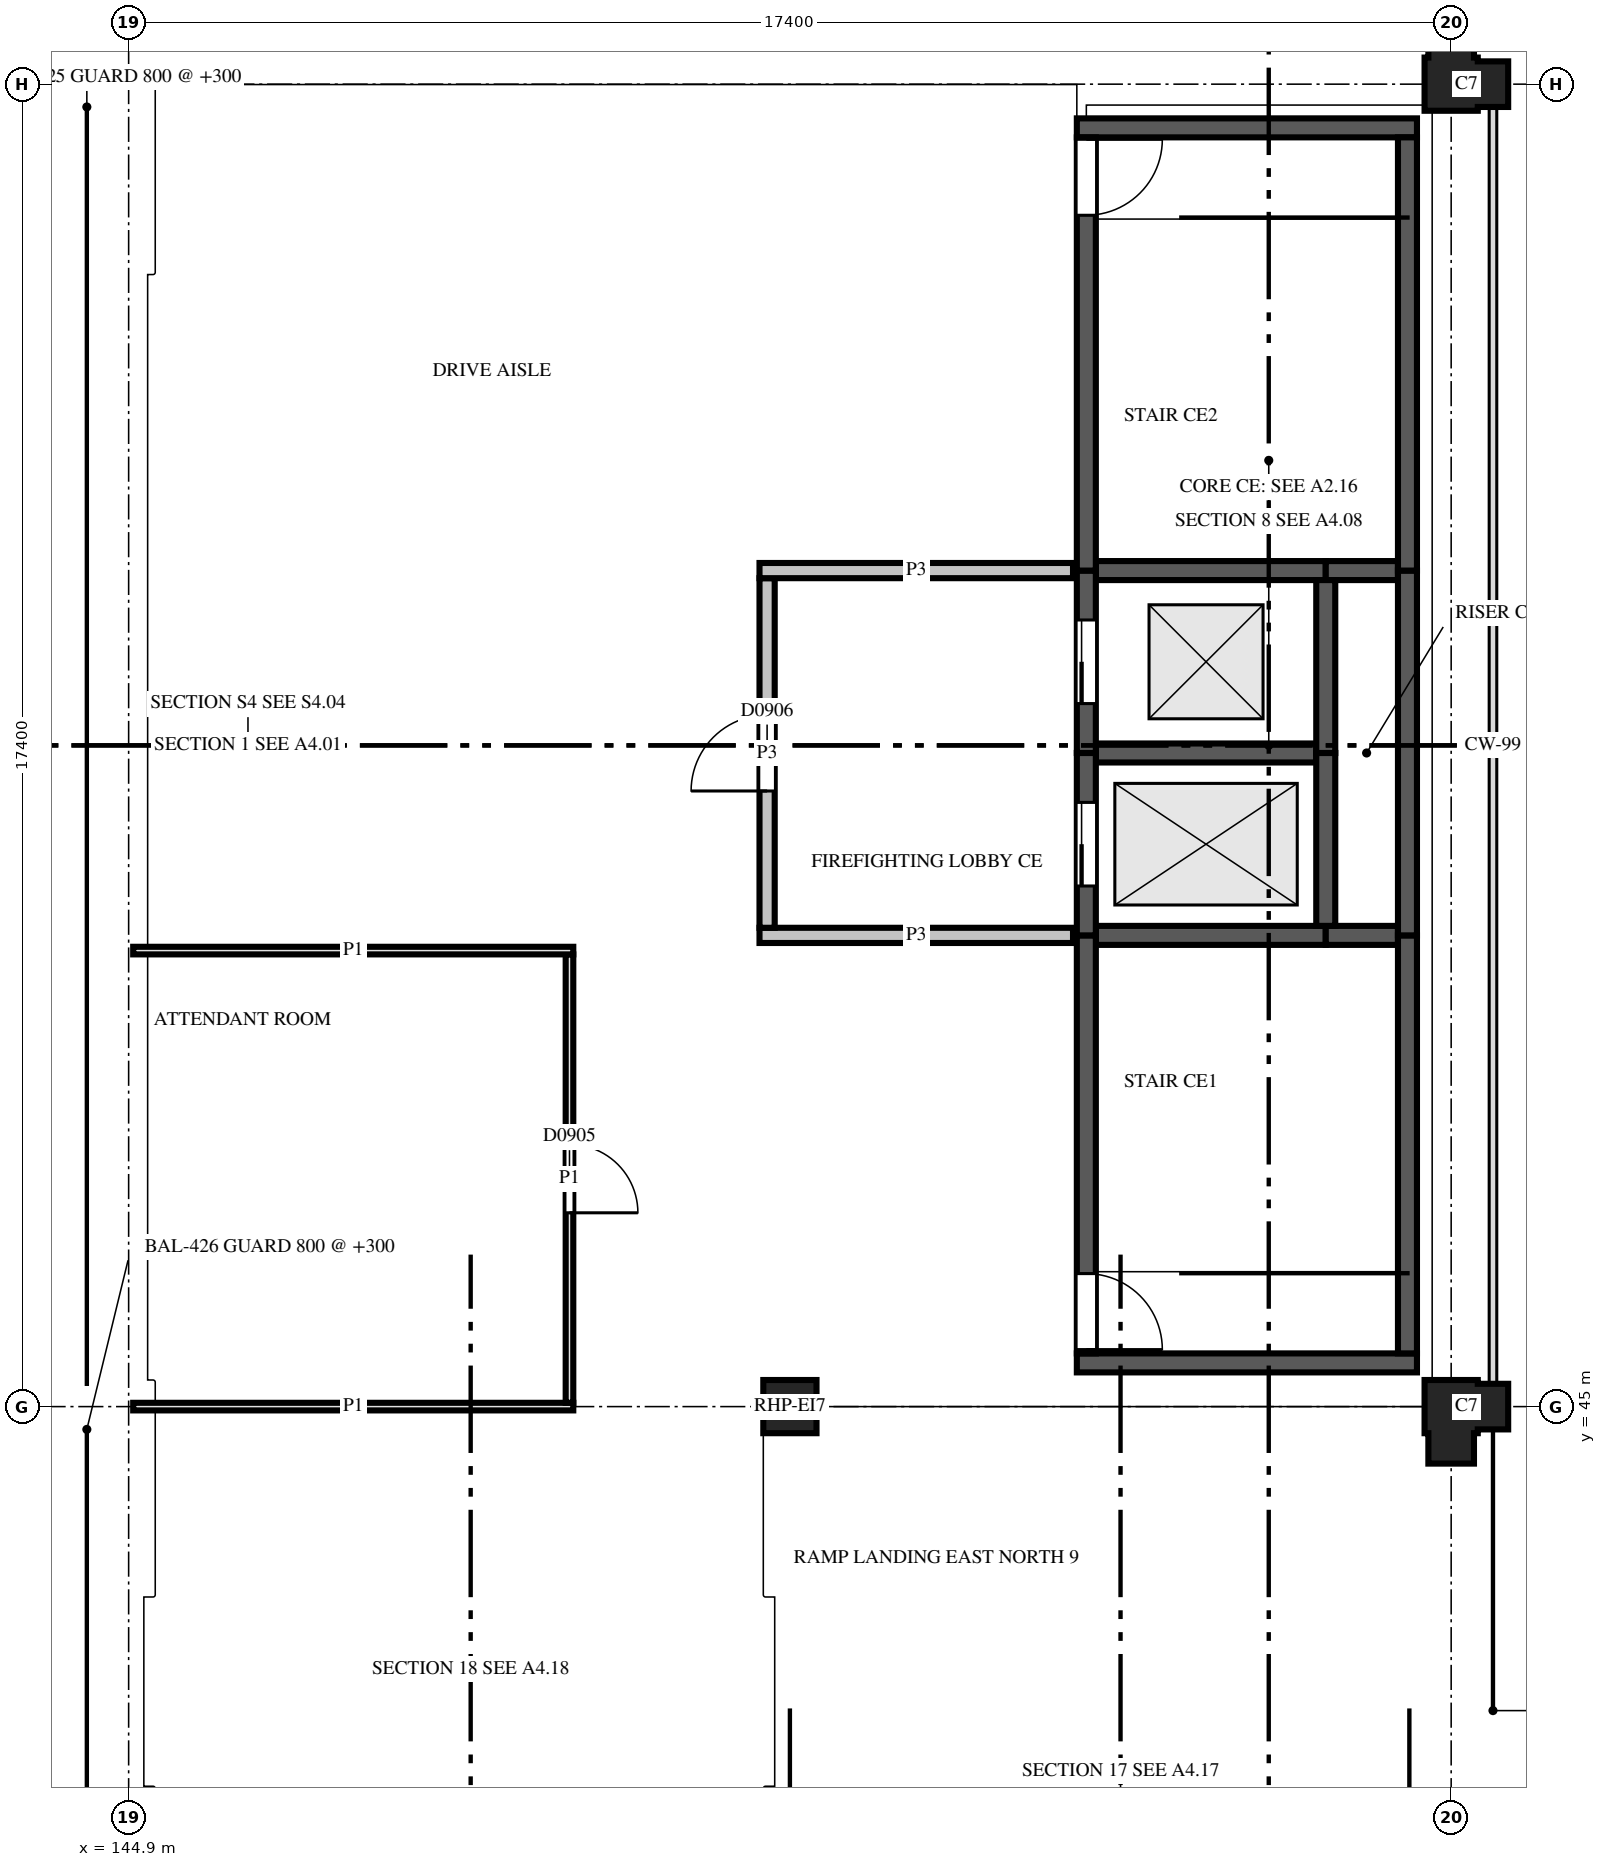
"""IFC4 building model, lengths in metres.
Left out: names, types, materials, properties, quantities, classifications, styles, units other than length and angle.
Written with IfcOpenShell. Run it as: python <this file> out.ifc"""

import sys

from ifc_helpers import new_model, si_unit, direction, frame, frame_2d, origin, origin_2d, place, context, subcontext, project, spatial, polyline, rectangle, outline, extrude, element, fill, save


model = new_model("IFC4")
c1 = context("Model", 3, precision=1e-05, world=origin(), true_north=direction((0.0, 1.0)))
c2 = subcontext(c1, "Body", "Model", "MODEL_VIEW")
j1 = project(units=[si_unit("LENGTHUNIT", "METRE"), si_unit("PLANEANGLEUNIT", "RADIAN")], contexts=[c1])
p1 = place(None, origin())
s1 = spatial("IfcSite", under=j1, at=p1, CompositionType="ELEMENT")
p2 = place(p1, origin())
s2 = spatial("IfcBuilding", under=s1, at=p2, CompositionType="ELEMENT")
p3 = place(p2, frame((0.0, 0.0, 34.1)))
s3 = spatial("IfcBuildingStorey", under=s2, at=p3, CompositionType="ELEMENT", Elevation=34.1)
for number, where, z_axis, x_axis in (
    (1, (162.3, 45.0, 0.0), (0.0, 0.0, 1.0), (0.0, -1.0, 0.0)),
    (2, (162.3, 62.4, 0.0), (0.0, 0.0, 1.0), (1.0, 0.0, 0.0)),
):
    element("IfcColumn", number, at=place(p3, frame(where, z_axis=z_axis, x_axis=x_axis)), inside=s3, PredefinedType="COLUMN", context=c2, shape_type="SweptSolid", body=[
        extrude(outline(polyline([(-0.35, -0.35), (0.35, -0.35), (0.35, -0.3), (0.75, -0.3), (0.75, 0.3), (0.35, 0.3), (0.35, 0.35), (0.3, 0.35), (0.3, 0.75), (-0.3, 0.75), (-0.3, 0.35), (-0.35, 0.35), (-0.35, -0.35)])), origin(), (0.0, 0.0, 1.0), 3.7),
    ])
p4 = place(p3, frame((157.375, 45.575, 0.0), z_axis=(0.0, 0.0, 1.0), x_axis=(1.0, 0.0, 0.0)))
e3 = element("IfcWall", 3, at=p4, inside=s3, PredefinedType="SHEAR", context=c2, shape_type="SweptSolid", body=[
    extrude(rectangle(XDim=4.475, YDim=0.25, at=frame_2d((2.238, 0.0))), origin(), (0.0, 0.0, 1.0), 3.45),
])
p5 = place(p3, frame((157.625, 51.2, 0.0), z_axis=(0.0, 0.0, 1.0), x_axis=(1.0, 0.0, 0.0)))
e4 = element("IfcWall", 4, at=p5, inside=s3, PredefinedType="SHEAR", context=c2, shape_type="SweptSolid", body=[
    extrude(rectangle(XDim=3.025, YDim=0.25, at=frame_2d((1.512, 0.0))), origin(), (0.0, 0.0, 1.0), 3.45),
])
p6 = place(p3, frame((160.65, 51.2, 0.0), z_axis=(0.0, 0.0, 1.0), x_axis=(1.0, 0.0, 0.0)))
e5 = element("IfcWall", 5, at=p6, inside=s3, PredefinedType="SHEAR", context=c2, shape_type="SweptSolid", body=[
    extrude(rectangle(XDim=0.95, YDim=0.25, at=frame_2d((0.475, 0.0))), origin(), (0.0, 0.0, 1.0), 3.45),
])
p7 = place(p3, frame((157.625, 53.6, 0.0), z_axis=(0.0, 0.0, 1.0), x_axis=(1.0, 0.0, 0.0)))
e6 = element("IfcWall", 6, at=p7, inside=s3, PredefinedType="SHEAR", context=c2, shape_type="SweptSolid", body=[
    extrude(rectangle(XDim=2.9, YDim=0.25, at=frame_2d((1.45, 0.0))), origin(), (0.0, 0.0, 1.0), 4.95),
])
p8 = place(p3, frame((157.625, 56.0, 0.0), z_axis=(0.0, 0.0, 1.0), x_axis=(1.0, 0.0, 0.0)))
e7 = element("IfcWall", 7, at=p8, inside=s3, PredefinedType="SHEAR", context=c2, shape_type="SweptSolid", body=[
    extrude(rectangle(XDim=3.025, YDim=0.25, at=frame_2d((1.512, 0.0))), origin(), (0.0, 0.0, 1.0), 3.45),
])
p9 = place(p3, frame((160.65, 56.0, 0.0), z_axis=(0.0, 0.0, 1.0), x_axis=(1.0, 0.0, 0.0)))
e8 = element("IfcWall", 8, at=p9, inside=s3, PredefinedType="SHEAR", context=c2, shape_type="SweptSolid", body=[
    extrude(rectangle(XDim=0.95, YDim=0.25, at=frame_2d((0.475, 0.0))), origin(), (0.0, 0.0, 1.0), 3.45),
])
p10 = place(p3, frame((157.375, 61.825, 0.0), z_axis=(0.0, 0.0, 1.0), x_axis=(1.0, 0.0, 0.0)))
e9 = element("IfcWall", 9, at=p10, inside=s3, PredefinedType="SHEAR", context=c2, shape_type="SweptSolid", body=[
    extrude(rectangle(XDim=4.475, YDim=0.25, at=frame_2d((2.238, 0.0))), origin(), (0.0, 0.0, 1.0), 3.45),
])
p11 = place(p3, frame((157.5, 45.7, 0.0), z_axis=(0.0, 0.0, 1.0), x_axis=(0.0, 1.0, 0.0)))
e10 = element("IfcWall", 10, at=p11, inside=s3, PredefinedType="SHEAR", context=c2, shape_type="SweptSolid", body=[
    extrude(rectangle(XDim=5.5, YDim=0.25, at=frame_2d((2.75, 0.0))), origin(), (0.0, 0.0, 1.0), 3.45),
])
p12 = place(p11, frame((0.05, 0.0, 0.0)))
e11 = element("IfcOpeningElement", 11, at=p12, cuts=e10, PredefinedType="OPENING", context=c2, shape_type="SweptSolid", body=[
    extrude(rectangle(XDim=1.0, YDim=2.1, at=frame_2d((0.5, 1.05))), frame((0.0, 0.135, 0.0), z_axis=(0.0, -1.0, 0.0), x_axis=(1.0, 0.0, 0.0)), (0.0, 0.0, 1.0), 0.27),
])
p13 = place(p3, frame((157.5, 51.2, 0.0), z_axis=(0.0, 0.0, 1.0), x_axis=(0.0, 1.0, 0.0)))
e12 = element("IfcWall", 12, at=p13, inside=s3, PredefinedType="SHEAR", context=c2, shape_type="SweptSolid", body=[
    extrude(rectangle(XDim=2.4, YDim=0.25, at=frame_2d((1.2, 0.0))), origin(), (0.0, 0.0, 1.0), 4.95),
])
p14 = place(p13, frame((0.65, 0.0, 0.0)))
e13 = element("IfcOpeningElement", 13, at=p14, cuts=e12, PredefinedType="OPENING", context=c2, shape_type="SweptSolid", body=[
    extrude(rectangle(XDim=1.1, YDim=2.1, at=frame_2d((0.55, 1.05))), frame((0.0, 0.135, 0.0), z_axis=(0.0, -1.0, 0.0), x_axis=(1.0, 0.0, 0.0)), (0.0, 0.0, 1.0), 0.27),
])
p15 = place(p3, frame((157.5, 53.6, 0.0), z_axis=(0.0, 0.0, 1.0), x_axis=(0.0, 1.0, 0.0)))
e14 = element("IfcWall", 14, at=p15, inside=s3, PredefinedType="SHEAR", context=c2, shape_type="SweptSolid", body=[
    extrude(rectangle(XDim=2.4, YDim=0.25, at=frame_2d((1.2, 0.0))), origin(), (0.0, 0.0, 1.0), 4.95),
])
p16 = place(p15, frame((0.65, 0.0, 0.0)))
e15 = element("IfcOpeningElement", 15, at=p16, cuts=e14, PredefinedType="OPENING", context=c2, shape_type="SweptSolid", body=[
    extrude(rectangle(XDim=1.1, YDim=2.1, at=frame_2d((0.55, 1.05))), frame((0.0, 0.135, 0.0), z_axis=(0.0, -1.0, 0.0), x_axis=(1.0, 0.0, 0.0)), (0.0, 0.0, 1.0), 0.27),
])
p17 = place(p3, frame((157.5, 56.0, 0.0), z_axis=(0.0, 0.0, 1.0), x_axis=(0.0, 1.0, 0.0)))
e16 = element("IfcWall", 16, at=p17, inside=s3, PredefinedType="SHEAR", context=c2, shape_type="SweptSolid", body=[
    extrude(rectangle(XDim=5.7, YDim=0.25, at=frame_2d((2.85, 0.0))), origin(), (0.0, 0.0, 1.0), 3.45),
])
p18 = place(p17, frame((4.675, 0.0, 0.0)))
e17 = element("IfcOpeningElement", 17, at=p18, cuts=e16, PredefinedType="OPENING", context=c2, shape_type="SweptSolid", body=[
    extrude(rectangle(XDim=1.0, YDim=2.1, at=frame_2d((0.5, 1.05))), frame((0.0, 0.135, 0.0), z_axis=(0.0, -1.0, 0.0), x_axis=(1.0, 0.0, 0.0)), (0.0, 0.0, 1.0), 0.27),
])
p19 = place(p3, frame((160.65, 51.325, 0.0), z_axis=(0.0, 0.0, 1.0), x_axis=(0.0, 1.0, 0.0)))
e18 = element("IfcWall", 18, at=p19, inside=s3, PredefinedType="SHEAR", context=c2, shape_type="SweptSolid", body=[
    extrude(rectangle(XDim=2.275, YDim=0.25, at=frame_2d((1.138, 0.0))), origin(), (0.0, 0.0, 1.0), 4.95),
])
p20 = place(p3, frame((160.65, 53.6, 0.0), z_axis=(0.0, 0.0, 1.0), x_axis=(0.0, 1.0, 0.0)))
e19 = element("IfcWall", 19, at=p20, inside=s3, PredefinedType="SHEAR", context=c2, shape_type="SweptSolid", body=[
    extrude(rectangle(XDim=2.275, YDim=0.25, at=frame_2d((1.137, 0.0))), origin(), (0.0, 0.0, 1.0), 4.95),
])
p21 = place(p3, frame((161.725, 45.7, 0.0), z_axis=(0.0, 0.0, 1.0), x_axis=(0.0, 1.0, 0.0)))
e20 = element("IfcWall", 20, at=p21, inside=s3, PredefinedType="SHEAR", context=c2, shape_type="SweptSolid", body=[
    extrude(rectangle(XDim=5.5, YDim=0.25, at=frame_2d((2.75, 0.0))), origin(), (0.0, 0.0, 1.0), 3.45),
])
p22 = place(p3, frame((161.725, 51.2, 0.0), z_axis=(0.0, 0.0, 1.0), x_axis=(0.0, 1.0, 0.0)))
e21 = element("IfcWall", 21, at=p22, inside=s3, PredefinedType="SHEAR", context=c2, shape_type="SweptSolid", body=[
    extrude(rectangle(XDim=4.8, YDim=0.25, at=frame_2d((2.4, 0.0))), origin(), (0.0, 0.0, 1.0), 3.45),
])
p23 = place(p3, frame((161.725, 56.0, 0.0), z_axis=(0.0, 0.0, 1.0), x_axis=(0.0, 1.0, 0.0)))
e22 = element("IfcWall", 22, at=p23, inside=s3, PredefinedType="SHEAR", context=c2, shape_type="SweptSolid", body=[
    extrude(rectangle(XDim=5.7, YDim=0.25, at=frame_2d((2.85, 0.0))), origin(), (0.0, 0.0, 1.0), 3.45),
])
p24 = place(p3, frame((162.3, 45.0, 3.7), z_axis=(0.0, 0.0, 1.0), x_axis=(1.0, 0.0, 0.0)))
e23 = element("IfcColumn", 23, at=p24, inside=s3, PredefinedType="COLUMN", context=c2, shape_type="SweptSolid", body=[
    extrude(rectangle(XDim=0.7, YDim=0.7, at=origin_2d()), origin(), (0.0, 0.0, 1.0), 0.4),
])
p25 = place(p3, frame((153.6, 45.0, 0.0), z_axis=(0.0, 0.0, 1.0), x_axis=(1.0, 0.0, 0.0)))
e24 = element("IfcColumn", 24, at=p25, inside=s3, PredefinedType="COLUMN", context=c2, shape_type="SweptSolid", body=[
    extrude(rectangle(XDim=0.7, YDim=0.7, at=origin_2d()), origin(), (0.0, 0.0, 1.0), 3.1),
])
p26 = place(p3, frame((144.96, 45.0, 0.0), z_axis=(0.0, 0.0, 1.0), x_axis=(1.0, 0.0, 0.0)))
e25 = element("IfcWall", 25, at=p26, inside=s3, PredefinedType="PARTITIONING", context=c2, shape_type="SweptSolid", body=[
    extrude(rectangle(XDim=5.79, YDim=0.1, at=frame_2d((2.895, 0.0))), origin(), (0.0, 0.0, 1.0), 2.88),
])
p27 = place(p3, frame((150.7, 45.05, 0.0), z_axis=(0.0, 0.0, 1.0), x_axis=(0.0, 1.0, 0.0)))
e26 = element("IfcWall", 26, at=p27, inside=s3, PredefinedType="PARTITIONING", context=c2, shape_type="SweptSolid", body=[
    extrude(rectangle(XDim=5.9, YDim=0.1, at=frame_2d((2.95, 0.0))), origin(), (0.0, 0.0, 1.0), 2.88),
])
p28 = place(p27, frame((2.5, 0.0, 0.0)))
e27 = element("IfcOpeningElement", 27, at=p28, cuts=e26, PredefinedType="OPENING", context=c2, shape_type="SweptSolid", body=[
    extrude(rectangle(XDim=0.9, YDim=2.1, at=frame_2d((0.45, 1.05))), frame((0.0, 0.06, 0.0), z_axis=(0.0, -1.0, 0.0), x_axis=(1.0, 0.0, 0.0)), (0.0, 0.0, 1.0), 0.12),
])
p29 = place(p3, frame((150.75, 51.0, 0.0), z_axis=(0.0, 0.0, 1.0), x_axis=(-1.0, 0.0, 0.0)))
e28 = element("IfcWall", 28, at=p29, inside=s3, PredefinedType="PARTITIONING", context=c2, shape_type="SweptSolid", body=[
    extrude(rectangle(XDim=5.79, YDim=0.1, at=frame_2d((2.895, 0.0))), origin(), (0.0, 0.0, 1.0), 2.88),
])
p30 = place(p3, frame((153.2, 51.2, 0.0), z_axis=(0.0, 0.0, 1.0), x_axis=(1.0, 0.0, 0.0)))
e29 = element("IfcWall", 29, at=p30, inside=s3, PredefinedType="PARTITIONING", context=c2, shape_type="SweptSolid", body=[
    extrude(rectangle(XDim=4.125, YDim=0.2, at=frame_2d((2.062, 0.0))), origin(), (0.0, 0.0, 1.0), 2.88),
])
p31 = place(p3, frame((153.3, 55.9, 0.0), z_axis=(0.0, 0.0, 1.0), x_axis=(0.0, -1.0, 0.0)))
e30 = element("IfcWall", 30, at=p31, inside=s3, PredefinedType="PARTITIONING", context=c2, shape_type="SweptSolid", body=[
    extrude(rectangle(XDim=4.6, YDim=0.2, at=frame_2d((2.3, 0.0))), origin(), (0.0, 0.0, 1.0), 2.88),
])
p32 = place(p31, frame((1.8, 0.0, 0.0)))
e31 = element("IfcOpeningElement", 31, at=p32, cuts=e30, PredefinedType="OPENING", context=c2, shape_type="SweptSolid", body=[
    extrude(rectangle(XDim=1.0, YDim=2.1, at=frame_2d((0.5, 1.05))), frame((0.0, 0.11, 0.0), z_axis=(0.0, -1.0, 0.0), x_axis=(1.0, 0.0, 0.0)), (0.0, 0.0, 1.0), 0.22),
])
p33 = place(p3, frame((157.325, 56.0, 0.0), z_axis=(0.0, 0.0, 1.0), x_axis=(-1.0, 0.0, 0.0)))
e32 = element("IfcWall", 32, at=p33, inside=s3, PredefinedType="PARTITIONING", context=c2, shape_type="SweptSolid", body=[
    extrude(rectangle(XDim=4.125, YDim=0.2, at=frame_2d((2.062, 0.0))), origin(), (0.0, 0.0, 1.0), 2.88),
])
p34 = place(p28, frame((0.9, 0.0, 0.0), z_axis=(0.0, 0.0, 1.0), x_axis=(-1.0, 0.0, 0.0)))
e33 = element("IfcDoor", 33, at=p34, inside=s3, OperationType="SINGLE_SWING_LEFT", PredefinedType="DOOR", context=c2, shape_type="SweptSolid", body=[
    extrude(rectangle(XDim=0.9, YDim=2.1, at=frame_2d((0.45, 1.05))), frame((0.0, 0.025, 0.0), z_axis=(0.0, -1.0, 0.0), x_axis=(1.0, 0.0, 0.0)), (0.0, 0.0, 1.0), 0.05),
])
fill(e27, e33)
p35 = place(p32, frame((1.0, 0.0, 0.0), z_axis=(0.0, 0.0, 1.0), x_axis=(-1.0, 0.0, 0.0)))
e34 = element("IfcDoor", 34, at=p35, inside=s3, OperationType="SINGLE_SWING_RIGHT", PredefinedType="DOOR", context=c2, shape_type="SweptSolid", body=[
    extrude(rectangle(XDim=1.0, YDim=2.1, at=frame_2d((0.5, 1.05))), frame((0.0, 0.025, 0.0), z_axis=(0.0, -1.0, 0.0), x_axis=(1.0, 0.0, 0.0)), (0.0, 0.0, 1.0), 0.05),
])
fill(e31, e34)
p36 = place(p14, origin())
e35 = element("IfcDoor", 35, at=p36, inside=s3, OperationType="SLIDING_TO_LEFT", PredefinedType="DOOR", context=c2, shape_type="SweptSolid", body=[
    extrude(rectangle(XDim=1.1, YDim=2.1, at=frame_2d((0.55, 1.05))), frame((0.0, 0.025, 0.0), z_axis=(0.0, -1.0, 0.0), x_axis=(1.0, 0.0, 0.0)), (0.0, 0.0, 1.0), 0.05),
])
fill(e13, e35)
p37 = place(p16, origin())
e36 = element("IfcDoor", 36, at=p37, inside=s3, OperationType="SLIDING_TO_LEFT", PredefinedType="DOOR", context=c2, shape_type="SweptSolid", body=[
    extrude(rectangle(XDim=1.1, YDim=2.1, at=frame_2d((0.55, 1.05))), frame((0.0, 0.025, 0.0), z_axis=(0.0, -1.0, 0.0), x_axis=(1.0, 0.0, 0.0)), (0.0, 0.0, 1.0), 0.05),
])
fill(e15, e36)
p38 = place(p18, origin())
e37 = element("IfcDoor", 37, at=p38, inside=s3, OperationType="SINGLE_SWING_RIGHT", PredefinedType="DOOR", context=c2, shape_type="SweptSolid", body=[
    extrude(rectangle(XDim=1.0, YDim=2.1, at=frame_2d((0.5, 1.05))), frame((0.0, 0.025, 0.0), z_axis=(0.0, -1.0, 0.0), x_axis=(1.0, 0.0, 0.0)), (0.0, 0.0, 1.0), 0.05),
])
fill(e17, e37)
p39 = place(p12, origin())
e38 = element("IfcDoor", 38, at=p39, inside=s3, OperationType="SINGLE_SWING_LEFT", PredefinedType="DOOR", context=c2, shape_type="SweptSolid", body=[
    extrude(rectangle(XDim=1.0, YDim=2.1, at=frame_2d((0.5, 1.05))), frame((0.0, 0.025, 0.0), z_axis=(0.0, -1.0, 0.0), x_axis=(1.0, 0.0, 0.0)), (0.0, 0.0, 1.0), 0.05),
])
fill(e11, e38)
save(model, sys.argv[1])
